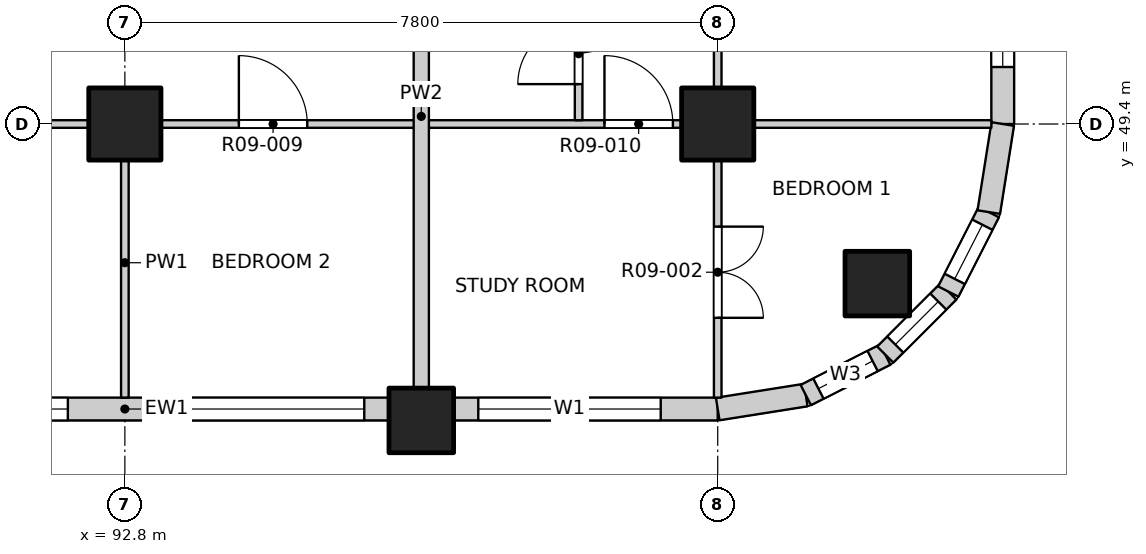
"""IFC4 building model, lengths in metres.
Left out: names, types, materials, properties, quantities, classifications, styles, units other than length and angle.
Written with IfcOpenShell. Run it as: python <this file> out.ifc"""

import sys

from ifc_helpers import new_model, si_unit, direction, frame, frame_2d, origin, origin_2d, place, context, subcontext, project, spatial, rectangle, extrude, element, fill, save


model = new_model("IFC4")
c1 = context("Model", 3, precision=1e-05, world=origin(), true_north=direction((0.0, 1.0)))
c2 = subcontext(c1, "Body", "Model", "MODEL_VIEW")
j1 = project(units=[si_unit("LENGTHUNIT", "METRE"), si_unit("PLANEANGLEUNIT", "RADIAN")], contexts=[c1])
p1 = place(None, origin())
s1 = spatial("IfcSite", under=j1, at=p1, CompositionType="ELEMENT")
p2 = place(p1, origin())
s2 = spatial("IfcBuilding", under=s1, at=p2, CompositionType="ELEMENT")
p3 = place(p2, frame((0.0, 0.0, 110.1)))
s3 = spatial("IfcBuildingStorey", under=s2, at=p3, CompositionType="ELEMENT", Elevation=110.1)
for number, where, z_axis, x_axis in (
    (1, (102.7, 47.3, -0.25), (0.0, 0.0, 1.0), (1.0, 0.0, 0.0)),
    (2, (96.7, 45.5, -0.25), (0.0, 0.0, 1.0), (1.0, 0.0, 0.0)),
):
    element("IfcColumn", number, at=place(p3, frame(where, z_axis=z_axis, x_axis=x_axis)), inside=s3, PredefinedType="COLUMN", context=c2, shape_type="SweptSolid", body=[
        extrude(rectangle(XDim=0.85, YDim=0.85, at=origin_2d()), origin(), (0.0, 0.0, 1.0), 3.4),
    ])
for number, where, z_axis, x_axis in (
    (3, (92.8, 49.4, -0.25), (0.0, 0.0, 1.0), (1.0, 0.0, 0.0)),
    (4, (100.6, 49.4, -0.25), (0.0, 0.0, 1.0), (1.0, 0.0, 0.0)),
):
    element("IfcColumn", number, at=place(p3, frame(where, z_axis=z_axis, x_axis=x_axis)), inside=s3, PredefinedType="COLUMN", context=c2, shape_type="SweptSolid", body=[
        extrude(rectangle(XDim=0.95, YDim=0.95, at=origin_2d()), origin(), (0.0, 0.0, 1.0), 3.4),
    ])
p4 = place(p3, frame((89.325, 45.65, 0.0), z_axis=(0.0, 0.0, 1.0), x_axis=(1.0, 0.0, 0.0)))
e5 = element("IfcWall", 5, at=p4, inside=s3, PredefinedType="SOLIDWALL", context=c2, shape_type="SweptSolid", body=[
    extrude(rectangle(XDim=6.95, YDim=0.3, at=frame_2d((3.475, 0.0))), origin(), (0.0, 0.0, 1.0), 2.7),
])
p5 = place(p4, frame((0.325, 0.0, 0.9)))
e6 = element("IfcOpeningElement", 6, at=p5, cuts=e5, PredefinedType="OPENING", context=c2, shape_type="SweptSolid", body=[
    extrude(rectangle(XDim=2.4, YDim=1.8, at=frame_2d((1.2, 0.9))), frame((0.0, 0.16, 0.0), z_axis=(0.0, -1.0, 0.0), x_axis=(1.0, 0.0, 0.0)), (0.0, 0.0, 1.0), 0.32),
])
p6 = place(p4, frame((4.225, 0.0, 0.9)))
e7 = element("IfcOpeningElement", 7, at=p6, cuts=e5, PredefinedType="OPENING", context=c2, shape_type="SweptSolid", body=[
    extrude(rectangle(XDim=2.4, YDim=1.8, at=frame_2d((1.2, 0.9))), frame((0.0, 0.16, 0.0), z_axis=(0.0, -1.0, 0.0), x_axis=(1.0, 0.0, 0.0)), (0.0, 0.0, 1.0), 0.32),
])
p7 = place(p3, frame((97.125, 45.65, 0.0), z_axis=(0.0, 0.0, 1.0), x_axis=(1.0, 0.0, 0.0)))
e8 = element("IfcWall", 8, at=p7, inside=s3, PredefinedType="SOLIDWALL", context=c2, shape_type="SweptSolid", body=[
    extrude(rectangle(XDim=3.475, YDim=0.3, at=frame_2d((1.738, 0.0))), origin(), (0.0, 0.0, 1.0), 2.7),
])
p8 = place(p7, frame((0.325, 0.0, 0.9)))
e9 = element("IfcOpeningElement", 9, at=p8, cuts=e8, PredefinedType="OPENING", context=c2, shape_type="SweptSolid", body=[
    extrude(rectangle(XDim=2.4, YDim=1.8, at=frame_2d((1.2, 0.9))), frame((0.0, 0.16, 0.0), z_axis=(0.0, -1.0, 0.0), x_axis=(1.0, 0.0, 0.0)), (0.0, 0.0, 1.0), 0.32),
])
p9 = place(p3, frame((104.35, 49.4, 0.0), z_axis=(0.0, 0.0, 1.0), x_axis=(0.0, 1.0, 0.0)))
e10 = element("IfcWall", 10, at=p9, inside=s3, PredefinedType="SOLIDWALL", context=c2, shape_type="SweptSolid", body=[
    extrude(rectangle(XDim=3.475, YDim=0.3, at=frame_2d((1.738, 0.0))), origin(), (0.0, 0.0, 1.0), 2.7),
])
p10 = place(p9, frame((0.75, 0.0, 0.9)))
e11 = element("IfcOpeningElement", 11, at=p10, cuts=e10, PredefinedType="OPENING", context=c2, shape_type="SweptSolid", body=[
    extrude(rectangle(XDim=2.4, YDim=1.8, at=frame_2d((1.2, 0.9))), frame((0.0, 0.16, 0.0), z_axis=(0.0, -1.0, 0.0), x_axis=(1.0, 0.0, 0.0)), (0.0, 0.0, 1.0), 0.32),
])
p11 = place(p3, frame((100.6, 45.65, 0.0), z_axis=(0.0, 0.0, 1.0), x_axis=(0.987678452879, 0.156496880861, 0.0)))
e12 = element("IfcWall", 12, at=p11, inside=s3, PredefinedType="SOLIDWALL", context=c2, shape_type="SweptSolid", body=[
    extrude(rectangle(XDim=1.173, YDim=0.3, at=frame_2d((0.586, 0.0))), origin(), (0.0, 0.0, 1.0), 2.7),
])
p12 = place(p3, frame((101.759, 45.833, 0.0), z_axis=(0.0, 0.0, 1.0), x_axis=(0.890988677504, 0.454025524128, 0.0)))
e13 = element("IfcWall", 13, at=p12, inside=s3, PredefinedType="SOLIDWALL", context=c2, shape_type="SweptSolid", body=[
    extrude(rectangle(XDim=1.173, YDim=0.3, at=frame_2d((0.587, 0.0))), origin(), (0.0, 0.0, 1.0), 2.7),
])
p13 = place(p12, frame((0.187, 0.0, 0.9)))
e14 = element("IfcOpeningElement", 14, at=p13, cuts=e13, PredefinedType="OPENING", context=c2, shape_type="SweptSolid", body=[
    extrude(rectangle(XDim=0.8, YDim=1.2, at=frame_2d((0.4, 0.6))), frame((0.0, 0.16, 0.0), z_axis=(0.0, -1.0, 0.0), x_axis=(1.0, 0.0, 0.0)), (0.0, 0.0, 1.0), 0.32),
])
p14 = place(p3, frame((102.804, 46.366, 0.0), z_axis=(0.0, 0.0, 1.0), x_axis=(0.707106781187, 0.707106781187, 0.0)))
e15 = element("IfcWall", 15, at=p14, inside=s3, PredefinedType="SOLIDWALL", context=c2, shape_type="SweptSolid", body=[
    extrude(rectangle(XDim=1.173, YDim=0.3, at=frame_2d((0.586, 0.0))), origin(), (0.0, 0.0, 1.0), 2.7),
])
p15 = place(p14, frame((0.187, 0.0, 0.9)))
e16 = element("IfcOpeningElement", 16, at=p15, cuts=e15, PredefinedType="OPENING", context=c2, shape_type="SweptSolid", body=[
    extrude(rectangle(XDim=0.8, YDim=1.2, at=frame_2d((0.4, 0.6))), frame((0.0, 0.16, 0.0), z_axis=(0.0, -1.0, 0.0), x_axis=(1.0, 0.0, 0.0)), (0.0, 0.0, 1.0), 0.32),
])
p16 = place(p3, frame((103.634, 47.196, 0.0), z_axis=(0.0, 0.0, 1.0), x_axis=(0.454025524128, 0.890988677504, 0.0)))
e17 = element("IfcWall", 17, at=p16, inside=s3, PredefinedType="SOLIDWALL", context=c2, shape_type="SweptSolid", body=[
    extrude(rectangle(XDim=1.173, YDim=0.3, at=frame_2d((0.587, 0.0))), origin(), (0.0, 0.0, 1.0), 2.7),
])
p17 = place(p16, frame((0.187, 0.0, 0.9)))
e18 = element("IfcOpeningElement", 18, at=p17, cuts=e17, PredefinedType="OPENING", context=c2, shape_type="SweptSolid", body=[
    extrude(rectangle(XDim=0.8, YDim=1.2, at=frame_2d((0.4, 0.6))), frame((0.0, 0.16, 0.0), z_axis=(0.0, -1.0, 0.0), x_axis=(1.0, 0.0, 0.0)), (0.0, 0.0, 1.0), 0.32),
])
p18 = place(p3, frame((104.167, 48.241, 0.0), z_axis=(0.0, 0.0, 1.0), x_axis=(0.156496880861, 0.987678452879, 0.0)))
e19 = element("IfcWall", 19, at=p18, inside=s3, PredefinedType="SOLIDWALL", context=c2, shape_type="SweptSolid", body=[
    extrude(rectangle(XDim=1.173, YDim=0.3, at=frame_2d((0.586, 0.0))), origin(), (0.0, 0.0, 1.0), 2.7),
])
p19 = place(p3, frame((65.8, 49.4, 0.0), z_axis=(0.0, 0.0, 1.0), x_axis=(1.0, 0.0, 0.0)))
e20 = element("IfcWall", 20, at=p19, inside=s3, PredefinedType="PARTITIONING", context=c2, shape_type="SweptSolid", body=[
    extrude(rectangle(XDim=38.4, YDim=0.1, at=frame_2d((19.2, 0.0))), origin(), (0.0, 0.0, 1.0), 3.15),
])
p20 = place(p19, frame((4.19, 0.0, 0.0)))
e21 = element("IfcOpeningElement", 21, at=p20, cuts=e20, PredefinedType="OPENING", context=c2, shape_type="SweptSolid", body=[
    extrude(rectangle(XDim=0.9, YDim=2.1, at=frame_2d((0.45, 1.05))), frame((0.0, 0.06, 0.0), z_axis=(0.0, -1.0, 0.0), x_axis=(1.0, 0.0, 0.0)), (0.0, 0.0, 1.0), 0.12),
])
p21 = place(p19, frame((9.0, 0.0, 0.0)))
e22 = element("IfcOpeningElement", 22, at=p21, cuts=e20, PredefinedType="OPENING", context=c2, shape_type="SweptSolid", body=[
    extrude(rectangle(XDim=0.9, YDim=2.1, at=frame_2d((0.45, 1.05))), frame((0.0, 0.06, 0.0), z_axis=(0.0, -1.0, 0.0), x_axis=(1.0, 0.0, 0.0)), (0.0, 0.0, 1.0), 0.12),
])
p22 = place(p19, frame((12.9, 0.0, 0.0)))
e23 = element("IfcOpeningElement", 23, at=p22, cuts=e20, PredefinedType="OPENING", context=c2, shape_type="SweptSolid", body=[
    extrude(rectangle(XDim=0.9, YDim=2.1, at=frame_2d((0.45, 1.05))), frame((0.0, 0.06, 0.0), z_axis=(0.0, -1.0, 0.0), x_axis=(1.0, 0.0, 0.0)), (0.0, 0.0, 1.0), 0.12),
])
p23 = place(p19, frame((16.8, 0.0, 0.0)))
e24 = element("IfcOpeningElement", 24, at=p23, cuts=e20, PredefinedType="OPENING", context=c2, shape_type="SweptSolid", body=[
    extrude(rectangle(XDim=0.9, YDim=2.1, at=frame_2d((0.45, 1.05))), frame((0.0, 0.06, 0.0), z_axis=(0.0, -1.0, 0.0), x_axis=(1.0, 0.0, 0.0)), (0.0, 0.0, 1.0), 0.12),
])
p24 = place(p19, frame((20.7, 0.0, 0.0)))
e25 = element("IfcOpeningElement", 25, at=p24, cuts=e20, PredefinedType="OPENING", context=c2, shape_type="SweptSolid", body=[
    extrude(rectangle(XDim=0.9, YDim=2.1, at=frame_2d((0.45, 1.05))), frame((0.0, 0.06, 0.0), z_axis=(0.0, -1.0, 0.0), x_axis=(1.0, 0.0, 0.0)), (0.0, 0.0, 1.0), 0.12),
])
p25 = place(p19, frame((24.6, 0.0, 0.0)))
e26 = element("IfcOpeningElement", 26, at=p25, cuts=e20, PredefinedType="OPENING", context=c2, shape_type="SweptSolid", body=[
    extrude(rectangle(XDim=0.9, YDim=2.1, at=frame_2d((0.45, 1.05))), frame((0.0, 0.06, 0.0), z_axis=(0.0, -1.0, 0.0), x_axis=(1.0, 0.0, 0.0)), (0.0, 0.0, 1.0), 0.12),
])
p26 = place(p19, frame((28.5, 0.0, 0.0)))
e27 = element("IfcOpeningElement", 27, at=p26, cuts=e20, PredefinedType="OPENING", context=c2, shape_type="SweptSolid", body=[
    extrude(rectangle(XDim=0.9, YDim=2.1, at=frame_2d((0.45, 1.05))), frame((0.0, 0.06, 0.0), z_axis=(0.0, -1.0, 0.0), x_axis=(1.0, 0.0, 0.0)), (0.0, 0.0, 1.0), 0.12),
])
p27 = place(p19, frame((33.31, 0.0, 0.0)))
e28 = element("IfcOpeningElement", 28, at=p27, cuts=e20, PredefinedType="OPENING", context=c2, shape_type="SweptSolid", body=[
    extrude(rectangle(XDim=0.9, YDim=2.1, at=frame_2d((0.45, 1.05))), frame((0.0, 0.06, 0.0), z_axis=(0.0, -1.0, 0.0), x_axis=(1.0, 0.0, 0.0)), (0.0, 0.0, 1.0), 0.12),
])
p28 = place(p3, frame((92.8, 45.8, 0.0), z_axis=(0.0, 0.0, 1.0), x_axis=(0.0, 1.0, 0.0)))
e29 = element("IfcWall", 29, at=p28, inside=s3, PredefinedType="PARTITIONING", context=c2, shape_type="SweptSolid", body=[
    extrude(rectangle(XDim=3.55, YDim=0.1, at=frame_2d((1.775, 0.0))), origin(), (0.0, 0.0, 1.0), 3.15),
])
p29 = place(p3, frame((96.7, 45.8, 0.0), z_axis=(0.0, 0.0, 1.0), x_axis=(0.0, 1.0, 0.0)))
e30 = element("IfcWall", 30, at=p29, inside=s3, PredefinedType="PARTITIONING", context=c2, shape_type="SweptSolid", body=[
    extrude(rectangle(XDim=7.4, YDim=0.2, at=frame_2d((3.7, 0.0))), origin(), (0.0, 0.0, 1.0), 3.15),
])
p30 = place(p3, frame((98.77, 49.45, 0.0), z_axis=(0.0, 0.0, 1.0), x_axis=(0.0, 1.0, 0.0)))
e31 = element("IfcWall", 31, at=p30, inside=s3, PredefinedType="PARTITIONING", context=c2, shape_type="SweptSolid", body=[
    extrude(rectangle(XDim=5.5, YDim=0.1, at=frame_2d((2.75, 0.0))), origin(), (0.0, 0.0, 1.0), 3.15),
])
p31 = place(p30, frame((0.475, 0.0, 0.0)))
e32 = element("IfcOpeningElement", 32, at=p31, cuts=e31, PredefinedType="OPENING", context=c2, shape_type="SweptSolid", body=[
    extrude(rectangle(XDim=0.8, YDim=2.1, at=frame_2d((0.4, 1.05))), frame((0.0, 0.06, 0.0), z_axis=(0.0, -1.0, 0.0), x_axis=(1.0, 0.0, 0.0)), (0.0, 0.0, 1.0), 0.12),
])
p32 = place(p30, frame((2.325, 0.0, 0.0)))
e33 = element("IfcOpeningElement", 33, at=p32, cuts=e31, PredefinedType="OPENING", context=c2, shape_type="SweptSolid", body=[
    extrude(rectangle(XDim=0.9, YDim=2.1, at=frame_2d((0.45, 1.05))), frame((0.0, 0.06, 0.0), z_axis=(0.0, -1.0, 0.0), x_axis=(1.0, 0.0, 0.0)), (0.0, 0.0, 1.0), 0.12),
])
p33 = place(p30, frame((4.2, 0.0, 0.0)))
e34 = element("IfcOpeningElement", 34, at=p33, cuts=e31, PredefinedType="OPENING", context=c2, shape_type="SweptSolid", body=[
    extrude(rectangle(XDim=0.9, YDim=2.1, at=frame_2d((0.45, 1.05))), frame((0.0, 0.06, 0.0), z_axis=(0.0, -1.0, 0.0), x_axis=(1.0, 0.0, 0.0)), (0.0, 0.0, 1.0), 0.12),
])
p34 = place(p3, frame((100.6, 45.8, 0.0), z_axis=(0.0, 0.0, 1.0), x_axis=(0.0, 1.0, 0.0)))
e35 = element("IfcWall", 35, at=p34, inside=s3, PredefinedType="PARTITIONING", context=c2, shape_type="SweptSolid", body=[
    extrude(rectangle(XDim=38.4, YDim=0.1, at=frame_2d((19.2, 0.0))), origin(), (0.0, 0.0, 1.0), 3.15),
])
p35 = place(p34, frame((1.05, 0.0, 0.0)))
e36 = element("IfcOpeningElement", 36, at=p35, cuts=e35, PredefinedType="OPENING", context=c2, shape_type="SweptSolid", body=[
    extrude(rectangle(XDim=1.2, YDim=2.1, at=frame_2d((0.6, 1.05))), frame((0.0, 0.06, 0.0), z_axis=(0.0, -1.0, 0.0), x_axis=(1.0, 0.0, 0.0)), (0.0, 0.0, 1.0), 0.12),
])
p36 = place(p34, frame((5.1, 0.0, 0.0)))
e37 = element("IfcOpeningElement", 37, at=p36, cuts=e35, PredefinedType="OPENING", context=c2, shape_type="SweptSolid", body=[
    extrude(rectangle(XDim=0.9, YDim=2.1, at=frame_2d((0.45, 1.05))), frame((0.0, 0.06, 0.0), z_axis=(0.0, -1.0, 0.0), x_axis=(1.0, 0.0, 0.0)), (0.0, 0.0, 1.0), 0.12),
])
p37 = place(p34, frame((9.625, 0.0, 0.0)))
e38 = element("IfcOpeningElement", 38, at=p37, cuts=e35, PredefinedType="OPENING", context=c2, shape_type="SweptSolid", body=[
    extrude(rectangle(XDim=1.2, YDim=2.1, at=frame_2d((0.6, 1.05))), frame((0.0, 0.06, 0.0), z_axis=(0.0, -1.0, 0.0), x_axis=(1.0, 0.0, 0.0)), (0.0, 0.0, 1.0), 0.12),
])
p38 = place(p34, frame((16.8, 0.0, 0.0)))
e39 = element("IfcOpeningElement", 39, at=p38, cuts=e35, PredefinedType="OPENING", context=c2, shape_type="SweptSolid", body=[
    extrude(rectangle(XDim=0.9, YDim=2.1, at=frame_2d((0.45, 1.05))), frame((0.0, 0.06, 0.0), z_axis=(0.0, -1.0, 0.0), x_axis=(1.0, 0.0, 0.0)), (0.0, 0.0, 1.0), 0.12),
])
p39 = place(p34, frame((20.7, 0.0, 0.0)))
e40 = element("IfcOpeningElement", 40, at=p39, cuts=e35, PredefinedType="OPENING", context=c2, shape_type="SweptSolid", body=[
    extrude(rectangle(XDim=0.9, YDim=2.1, at=frame_2d((0.45, 1.05))), frame((0.0, 0.06, 0.0), z_axis=(0.0, -1.0, 0.0), x_axis=(1.0, 0.0, 0.0)), (0.0, 0.0, 1.0), 0.12),
])
p40 = place(p34, frame((24.6, 0.0, 0.0)))
e41 = element("IfcOpeningElement", 41, at=p40, cuts=e35, PredefinedType="OPENING", context=c2, shape_type="SweptSolid", body=[
    extrude(rectangle(XDim=0.9, YDim=2.1, at=frame_2d((0.45, 1.05))), frame((0.0, 0.06, 0.0), z_axis=(0.0, -1.0, 0.0), x_axis=(1.0, 0.0, 0.0)), (0.0, 0.0, 1.0), 0.12),
])
p41 = place(p34, frame((28.5, 0.0, 0.0)))
e42 = element("IfcOpeningElement", 42, at=p41, cuts=e35, PredefinedType="OPENING", context=c2, shape_type="SweptSolid", body=[
    extrude(rectangle(XDim=0.9, YDim=2.1, at=frame_2d((0.45, 1.05))), frame((0.0, 0.06, 0.0), z_axis=(0.0, -1.0, 0.0), x_axis=(1.0, 0.0, 0.0)), (0.0, 0.0, 1.0), 0.12),
])
p42 = place(p34, frame((32.4, 0.0, 0.0)))
e43 = element("IfcOpeningElement", 43, at=p42, cuts=e35, PredefinedType="OPENING", context=c2, shape_type="SweptSolid", body=[
    extrude(rectangle(XDim=0.9, YDim=2.1, at=frame_2d((0.45, 1.05))), frame((0.0, 0.06, 0.0), z_axis=(0.0, -1.0, 0.0), x_axis=(1.0, 0.0, 0.0)), (0.0, 0.0, 1.0), 0.12),
])
p43 = place(p34, frame((36.15, 0.0, 0.0)))
e44 = element("IfcOpeningElement", 44, at=p43, cuts=e35, PredefinedType="OPENING", context=c2, shape_type="SweptSolid", body=[
    extrude(rectangle(XDim=1.2, YDim=2.1, at=frame_2d((0.6, 1.05))), frame((0.0, 0.06, 0.0), z_axis=(0.0, -1.0, 0.0), x_axis=(1.0, 0.0, 0.0)), (0.0, 0.0, 1.0), 0.12),
])
p44 = place(p5, origin())
e45 = element("IfcWindow", 45, at=p44, inside=s3, PartitioningType="DOUBLE_PANEL_VERTICAL", PredefinedType="WINDOW", context=c2, shape_type="SweptSolid", body=[
    extrude(rectangle(XDim=2.4, YDim=1.8, at=frame_2d((1.2, 0.9))), frame((0.0, 0.03, 0.0), z_axis=(0.0, -1.0, 0.0), x_axis=(1.0, 0.0, 0.0)), (0.0, 0.0, 1.0), 0.06),
])
fill(e6, e45)
p45 = place(p6, origin())
e46 = element("IfcWindow", 46, at=p45, inside=s3, PartitioningType="DOUBLE_PANEL_VERTICAL", PredefinedType="WINDOW", context=c2, shape_type="SweptSolid", body=[
    extrude(rectangle(XDim=2.4, YDim=1.8, at=frame_2d((1.2, 0.9))), frame((0.0, 0.03, 0.0), z_axis=(0.0, -1.0, 0.0), x_axis=(1.0, 0.0, 0.0)), (0.0, 0.0, 1.0), 0.06),
])
fill(e7, e46)
p46 = place(p8, origin())
e47 = element("IfcWindow", 47, at=p46, inside=s3, PartitioningType="DOUBLE_PANEL_VERTICAL", PredefinedType="WINDOW", context=c2, shape_type="SweptSolid", body=[
    extrude(rectangle(XDim=2.4, YDim=1.8, at=frame_2d((1.2, 0.9))), frame((0.0, 0.03, 0.0), z_axis=(0.0, -1.0, 0.0), x_axis=(1.0, 0.0, 0.0)), (0.0, 0.0, 1.0), 0.06),
])
fill(e9, e47)
p47 = place(p10, origin())
e48 = element("IfcWindow", 48, at=p47, inside=s3, PartitioningType="DOUBLE_PANEL_VERTICAL", PredefinedType="WINDOW", context=c2, shape_type="SweptSolid", body=[
    extrude(rectangle(XDim=2.4, YDim=1.8, at=frame_2d((1.2, 0.9))), frame((0.0, 0.03, 0.0), z_axis=(0.0, -1.0, 0.0), x_axis=(1.0, 0.0, 0.0)), (0.0, 0.0, 1.0), 0.06),
])
fill(e11, e48)
p48 = place(p13, origin())
e49 = element("IfcWindow", 49, at=p48, inside=s3, PartitioningType="SINGLE_PANEL", PredefinedType="WINDOW", context=c2, shape_type="SweptSolid", body=[
    extrude(rectangle(XDim=0.8, YDim=1.2, at=frame_2d((0.4, 0.6))), frame((0.0, 0.03, 0.0), z_axis=(0.0, -1.0, 0.0), x_axis=(1.0, 0.0, 0.0)), (0.0, 0.0, 1.0), 0.06),
])
fill(e14, e49)
p49 = place(p15, origin())
e50 = element("IfcWindow", 50, at=p49, inside=s3, PartitioningType="SINGLE_PANEL", PredefinedType="WINDOW", context=c2, shape_type="SweptSolid", body=[
    extrude(rectangle(XDim=0.8, YDim=1.2, at=frame_2d((0.4, 0.6))), frame((0.0, 0.03, 0.0), z_axis=(0.0, -1.0, 0.0), x_axis=(1.0, 0.0, 0.0)), (0.0, 0.0, 1.0), 0.06),
])
fill(e16, e50)
p50 = place(p17, origin())
e51 = element("IfcWindow", 51, at=p50, inside=s3, PartitioningType="SINGLE_PANEL", PredefinedType="WINDOW", context=c2, shape_type="SweptSolid", body=[
    extrude(rectangle(XDim=0.8, YDim=1.2, at=frame_2d((0.4, 0.6))), frame((0.0, 0.03, 0.0), z_axis=(0.0, -1.0, 0.0), x_axis=(1.0, 0.0, 0.0)), (0.0, 0.0, 1.0), 0.06),
])
fill(e18, e51)
p51 = place(p35, origin())
e52 = element("IfcDoor", 52, at=p51, inside=s3, OperationType="DOUBLE_DOOR_SINGLE_SWING", PredefinedType="DOOR", context=c2, shape_type="SweptSolid", body=[
    extrude(rectangle(XDim=1.2, YDim=2.1, at=frame_2d((0.6, 1.05))), frame((0.0, 0.025, 0.0), z_axis=(0.0, -1.0, 0.0), x_axis=(1.0, 0.0, 0.0)), (0.0, 0.0, 1.0), 0.05),
])
fill(e36, e52)
p52 = place(p26, origin())
e53 = element("IfcDoor", 53, at=p52, inside=s3, OperationType="SINGLE_SWING_LEFT", PredefinedType="DOOR", context=c2, shape_type="SweptSolid", body=[
    extrude(rectangle(XDim=0.9, YDim=2.1, at=frame_2d((0.45, 1.05))), frame((0.0, 0.025, 0.0), z_axis=(0.0, -1.0, 0.0), x_axis=(1.0, 0.0, 0.0)), (0.0, 0.0, 1.0), 0.05),
])
fill(e27, e53)
p53 = place(p27, origin())
e54 = element("IfcDoor", 54, at=p53, inside=s3, OperationType="SINGLE_SWING_LEFT", PredefinedType="DOOR", context=c2, shape_type="SweptSolid", body=[
    extrude(rectangle(XDim=0.9, YDim=2.1, at=frame_2d((0.45, 1.05))), frame((0.0, 0.025, 0.0), z_axis=(0.0, -1.0, 0.0), x_axis=(1.0, 0.0, 0.0)), (0.0, 0.0, 1.0), 0.05),
])
fill(e28, e54)
p54 = place(p31, origin())
e55 = element("IfcDoor", 55, at=p54, inside=s3, OperationType="SINGLE_SWING_LEFT", PredefinedType="DOOR", context=c2, shape_type="SweptSolid", body=[
    extrude(rectangle(XDim=0.8, YDim=2.1, at=frame_2d((0.4, 1.05))), frame((0.0, 0.025, 0.0), z_axis=(0.0, -1.0, 0.0), x_axis=(1.0, 0.0, 0.0)), (0.0, 0.0, 1.0), 0.05),
])
fill(e32, e55)
save(model, sys.argv[1])
